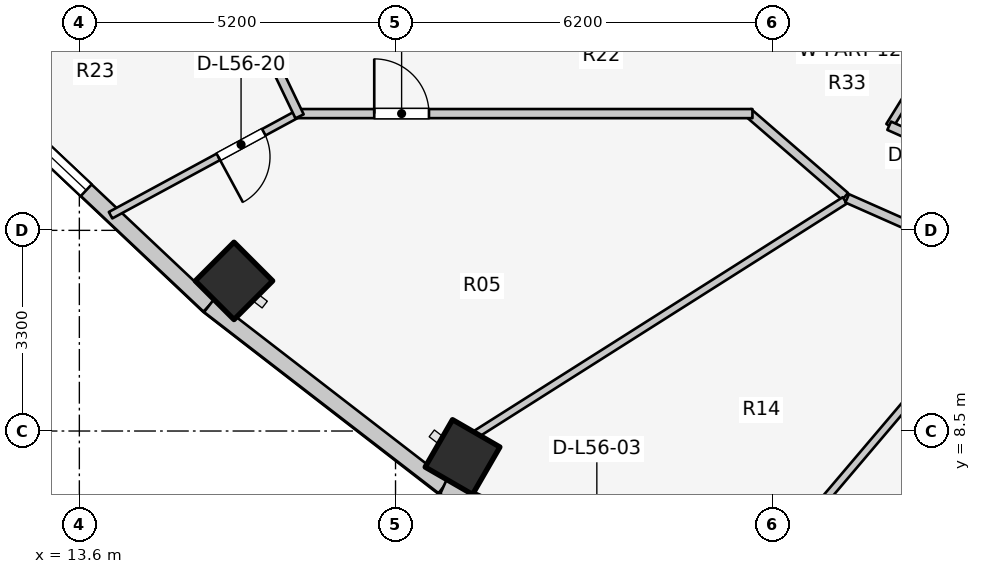
"""IFC4 building model, lengths in metres.
Left out: names, types, materials, properties, quantities, classifications, styles, units other than length and angle.
Written with IfcOpenShell. Run it as: python <this file> out.ifc"""

import sys

from ifc_helpers import new_model, si_unit, direction, frame, frame_2d, origin, origin_2d, place, context, subcontext, project, spatial, rectangle, extrude, element, fill, save


model = new_model("IFC4")
c1 = context("Model", 3, precision=1e-05, world=origin(), true_north=direction((0.0, 1.0)))
c2 = subcontext(c1, "Body", "Model", "MODEL_VIEW")
j1 = project(units=[si_unit("LENGTHUNIT", "METRE"), si_unit("PLANEANGLEUNIT", "RADIAN")], contexts=[c1])
p1 = place(None, origin())
s1 = spatial("IfcSite", under=j1, at=p1, CompositionType="ELEMENT")
p2 = place(p1, origin())
s2 = spatial("IfcBuilding", under=s1, at=p2, CompositionType="ELEMENT")
p3 = place(p2, frame((0.0, 0.0, 183.9)))
s3 = spatial("IfcBuildingStorey", under=s2, at=p3, CompositionType="ELEMENT", Elevation=183.9)
for number, where, z_axis, x_axis in (
    (1, (16.143, 10.969, 0.0), (0.0, 0.0, 1.0), (-0.707, -0.707, 0.0)),
    (2, (19.902, 8.072, 0.0), (0.0, 0.0, 1.0), (-0.5, -0.866, 0.0)),
):
    element("IfcColumn", number, at=place(p3, frame(where, z_axis=z_axis, x_axis=x_axis)), inside=s3, PredefinedType="COLUMN", context=c2, shape_type="SweptSolid", body=[
        extrude(rectangle(XDim=0.9, YDim=0.9, at=origin_2d()), origin(), (0.0, 0.0, 1.0), 3.1),
    ])
p4 = place(p3, frame((12.381, 13.716, 0.0), z_axis=(0.0, 0.0, 1.0), x_axis=(0.727667301037, -0.68593024354, 0.0)))
e3 = element("IfcWall", 3, at=p4, inside=s3, PredefinedType="STANDARD", context=c2, shape_type="SweptSolid", body=[
    extrude(rectangle(XDim=4.604, YDim=0.26, at=frame_2d((2.302, 0.0))), origin(), (0.0, 0.0, 1.0), 2.85),
])
p5 = place(p4, frame((0.631, 0.0, 0.75)))
e4 = element("IfcOpeningElement", 4, at=p5, cuts=e3, PredefinedType="OPENING", context=c2, shape_type="SweptSolid", body=[
    extrude(rectangle(XDim=1.2, YDim=1.5, at=frame_2d((0.6, 0.75))), frame((0.0, 0.14, 0.0), z_axis=(0.0, -1.0, 0.0), x_axis=(1.0, 0.0, 0.0)), (0.0, 0.0, 1.0), 0.28),
])
p6 = place(p3, frame((15.731, 10.559, 0.0), z_axis=(0.0, 0.0, 1.0), x_axis=(0.791460185804, -0.611220724687, 0.0)))
e5 = element("IfcWall", 5, at=p6, inside=s3, PredefinedType="STANDARD", context=c2, shape_type="SweptSolid", body=[
    extrude(rectangle(XDim=4.872, YDim=0.26, at=frame_2d((2.436, 0.0))), origin(), (0.0, 0.0, 1.0), 2.85),
])
p7 = place(p3, frame((19.587, 7.581, 0.0), z_axis=(0.0, 0.0, 1.0), x_axis=(0.912353637112, -0.409403029847, 0.0)))
e6 = element("IfcWall", 6, at=p7, inside=s3, PredefinedType="STANDARD", context=c2, shape_type="SweptSolid", body=[
    extrude(rectangle(XDim=5.533, YDim=0.26, at=frame_2d((2.766, 0.0))), origin(), (0.0, 0.0, 1.0), 2.88),
])
p8 = place(p7, frame((2.167, 0.0, 0.0)))
e7 = element("IfcOpeningElement", 7, at=p8, cuts=e6, PredefinedType="OPENING", context=c2, shape_type="SweptSolid", body=[
    extrude(rectangle(XDim=1.2, YDim=2.2, at=frame_2d((0.6, 1.1))), frame((0.0, 0.14, 0.0), z_axis=(0.0, -1.0, 0.0), x_axis=(1.0, 0.0, 0.0)), (0.0, 0.0, 1.0), 0.28),
])
p9 = place(p3, frame((17.244, 13.744, 0.0), z_axis=(0.0, 0.0, 1.0), x_axis=(-0.879385297668, -0.476110804587, 0.0)))
e8 = element("IfcWall", 8, at=p9, inside=s3, PredefinedType="MOVABLE", context=c2, shape_type="SweptSolid", body=[
    extrude(rectangle(XDim=3.56, YDim=0.12, at=frame_2d((1.78, 0.0))), origin(), (0.0, 0.0, 1.0), 2.22),
])
p10 = place(p9, frame((0.694, 0.0, 0.0)))
e9 = element("IfcOpeningElement", 9, at=p10, cuts=e8, PredefinedType="OPENING", context=c2, shape_type="SweptSolid", body=[
    extrude(rectangle(XDim=0.85, YDim=2.05, at=frame_2d((0.425, 1.025))), frame((0.0, 0.07, 0.0), z_axis=(0.0, -1.0, 0.0), x_axis=(1.0, 0.0, 0.0)), (0.0, 0.0, 1.0), 0.14),
])
p11 = place(p3, frame((26.193, 12.358, 0.0), z_axis=(0.0, 0.0, 1.0), x_axis=(-0.756055312247, 0.654507727092, 0.0)))
e10 = element("IfcWall", 10, at=p11, inside=s3, PredefinedType="PARTITIONING", context=c2, shape_type="SweptSolid", body=[
    extrude(rectangle(XDim=2.111, YDim=0.15, at=frame_2d((1.055, 0.0))), origin(), (0.0, 0.0, 1.0), 2.299),
])
p12 = place(p3, frame((17.15, 13.72, 0.0), z_axis=(0.0, 0.0, 1.0), x_axis=(1.0, 0.0, 0.0)))
e11 = element("IfcWall", 11, at=p12, inside=s3, PredefinedType="PARTITIONING", context=c2, shape_type="SweptSolid", body=[
    extrude(rectangle(XDim=7.52, YDim=0.15, at=frame_2d((3.76, 0.0))), origin(), (0.0, 0.0, 1.0), 2.299),
])
p13 = place(p12, frame((1.3, 0.0, 0.0)))
e12 = element("IfcOpeningElement", 12, at=p13, cuts=e11, PredefinedType="OPENING", context=c2, shape_type="SweptSolid", body=[
    extrude(rectangle(XDim=0.9, YDim=2.1, at=frame_2d((0.45, 1.05))), frame((0.0, 0.085, 0.0), z_axis=(0.0, -1.0, 0.0), x_axis=(1.0, 0.0, 0.0)), (0.0, 0.0, 1.0), 0.17),
])
p14 = place(p3, frame((17.222, 13.675, 0.0), z_axis=(0.0, 0.0, 1.0), x_axis=(-0.431973389813, 0.901886351207, 0.0)))
e13 = element("IfcWall", 13, at=p14, inside=s3, PredefinedType="PARTITIONING", context=c2, shape_type="SweptSolid", body=[
    extrude(rectangle(XDim=2.452, YDim=0.15, at=frame_2d((1.226, 0.0))), origin(), (0.0, 0.0, 1.0), 2.855),
])
p15 = place(p3, frame((28.45, 15.985, 0.0), z_axis=(0.0, 0.0, 1.0), x_axis=(-0.525627246902, -0.850714991824, 0.0)))
e14 = element("IfcWall", 14, at=p15, inside=s3, PredefinedType="PARTITIONING", context=c2, shape_type="SweptSolid", body=[
    extrude(rectangle(XDim=2.901, YDim=0.125, at=frame_2d((1.451, 0.0))), origin(), (0.0, 0.0, 1.0), 2.299),
])
p16 = place(p3, frame((26.919, 13.521, 0.0), z_axis=(0.0, 0.0, 1.0), x_axis=(0.912888568324, -0.408208845842, 0.0)))
e15 = element("IfcWall", 15, at=p16, inside=s3, PredefinedType="PARTITIONING", context=c2, shape_type="SweptSolid", body=[
    extrude(rectangle(XDim=2.69, YDim=0.15, at=frame_2d((1.345, 0.0))), origin(), (0.0, 0.0, 1.0), 2.299),
])
p17 = place(p3, frame((26.188, 12.292, 0.0), z_axis=(0.0, 0.0, 1.0), x_axis=(-0.844640430122, -0.535334048799, 0.0)))
e16 = element("IfcWall", 16, at=p17, inside=s3, PredefinedType="PARTITIONING", context=c2, shape_type="SweptSolid", body=[
    extrude(rectangle(XDim=7.188, YDim=0.125, at=frame_2d((3.594, 0.0))), origin(), (0.0, 0.0, 1.0), 2.299),
])
p18 = place(p3, frame((28.98, 11.048, 0.0), z_axis=(0.0, 0.0, 1.0), x_axis=(-0.647173462792, -0.762342776615, 0.0)))
e17 = element("IfcWall", 17, at=p18, inside=s3, PredefinedType="PARTITIONING", context=c2, shape_type="SweptSolid", body=[
    extrude(rectangle(XDim=6.253, YDim=0.125, at=frame_2d((3.127, 0.0))), origin(), (0.0, 0.0, 1.0), 2.299),
])
p19 = place(p3, frame((26.228, 12.326, 0.0), z_axis=(0.0, 0.0, 1.0), x_axis=(0.914324470734, -0.404982422108, 0.0)))
e18 = element("IfcWall", 18, at=p19, inside=s3, PredefinedType="PARTITIONING", context=c2, shape_type="SweptSolid", body=[
    extrude(rectangle(XDim=3.058, YDim=0.15, at=frame_2d((1.529, 0.0))), origin(), (0.0, 0.0, 1.0), 2.299),
])
p20 = place(p19, frame((1.029, 0.0, 0.0)))
e19 = element("IfcOpeningElement", 19, at=p20, cuts=e18, PredefinedType="OPENING", context=c2, shape_type="SweptSolid", body=[
    extrude(rectangle(XDim=1.0, YDim=2.1, at=frame_2d((0.5, 1.05))), frame((0.0, 0.085, 0.0), z_axis=(0.0, -1.0, 0.0), x_axis=(1.0, 0.0, 0.0)), (0.0, 0.0, 1.0), 0.17),
])
p21 = place(p5, origin())
e20 = element("IfcWindow", 20, at=p21, inside=s3, PartitioningType="SINGLE_PANEL", PredefinedType="WINDOW", context=c2, shape_type="SweptSolid", body=[
    extrude(rectangle(XDim=1.2, YDim=1.5, at=frame_2d((0.6, 0.75))), frame((0.0, 0.03, 0.0), z_axis=(0.0, -1.0, 0.0), x_axis=(1.0, 0.0, 0.0)), (0.0, 0.0, 1.0), 0.06),
])
fill(e4, e20)
p22 = place(p10, origin())
e21 = element("IfcDoor", 21, at=p22, inside=s3, OperationType="SINGLE_SWING_RIGHT", PredefinedType="DOOR", context=c2, shape_type="SweptSolid", body=[
    extrude(rectangle(XDim=0.85, YDim=2.05, at=frame_2d((0.425, 1.025))), frame((0.0, 0.025, 0.0), z_axis=(0.0, -1.0, 0.0), x_axis=(1.0, 0.0, 0.0)), (0.0, 0.0, 1.0), 0.05),
])
fill(e9, e21)
p23 = place(p13, origin())
e22 = element("IfcDoor", 22, at=p23, inside=s3, OperationType="SINGLE_SWING_LEFT", PredefinedType="DOOR", context=c2, shape_type="SweptSolid", body=[
    extrude(rectangle(XDim=0.9, YDim=2.1, at=frame_2d((0.45, 1.05))), frame((0.0, 0.025, 0.0), z_axis=(0.0, -1.0, 0.0), x_axis=(1.0, 0.0, 0.0)), (0.0, 0.0, 1.0), 0.05),
])
fill(e12, e22)
save(model, sys.argv[1])
